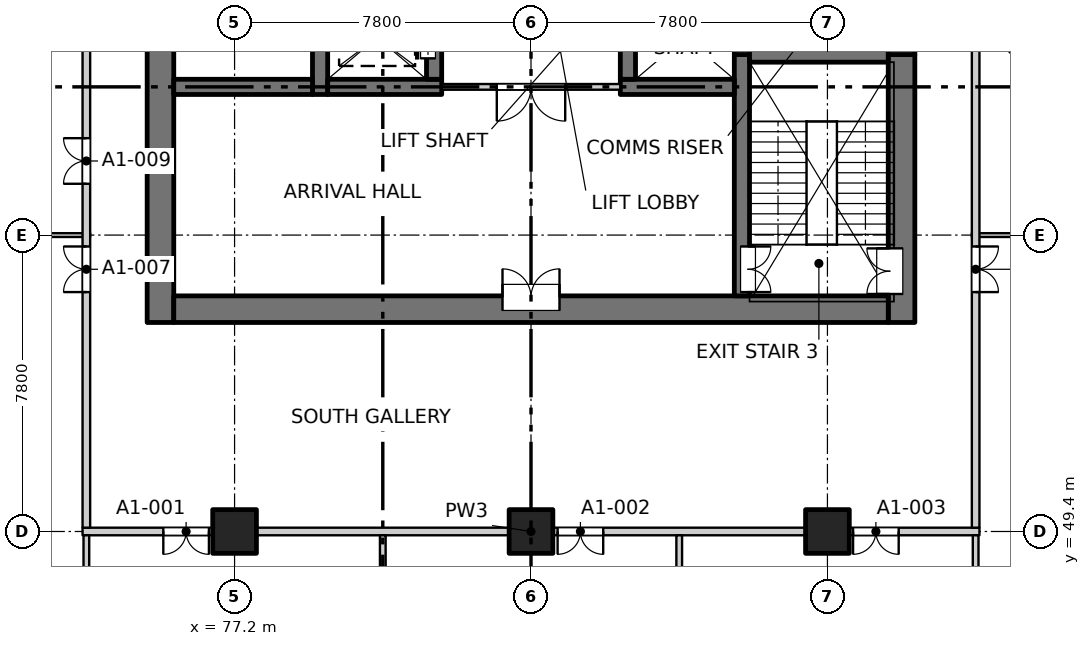
"""IFC4 building model, lengths in metres.
Left out: names, types, materials, properties, quantities, classifications, styles, units other than length and angle.
Written with IfcOpenShell. Run it as: python <this file> out.ifc"""

import sys

from ifc_helpers import new_model, si_unit, direction, frame, frame_2d, origin, origin_2d, place, context, subcontext, project, spatial, rectangle, extrude, element, fill, save


model = new_model("IFC4")
c1 = context("Model", 3, precision=1e-05, world=origin(), true_north=direction((0.0, 1.0)))
c2 = subcontext(c1, "Body", "Model", "MODEL_VIEW")
j1 = project(units=[si_unit("LENGTHUNIT", "METRE"), si_unit("PLANEANGLEUNIT", "RADIAN")], contexts=[c1])
p1 = place(None, origin())
s1 = spatial("IfcSite", under=j1, at=p1, CompositionType="ELEMENT")
p2 = place(p1, origin())
s2 = spatial("IfcBuilding", under=s1, at=p2, CompositionType="ELEMENT")
p3 = place(p2, frame((0.0, 0.0, 15.0)))
s3 = spatial("IfcBuildingStorey", under=s2, at=p3, CompositionType="ELEMENT", Elevation=15.0)
for number, where, z_axis, x_axis in (
    (1, (77.2, 49.4, -0.35), (0.0, 0.0, 1.0), (1.0, 0.0, 0.0)),
    (2, (85.0, 49.4, -0.35), (0.0, 0.0, 1.0), (1.0, 0.0, 0.0)),
    (3, (92.8, 49.4, -0.35), (0.0, 0.0, 1.0), (1.0, 0.0, 0.0)),
):
    element("IfcColumn", number, at=place(p3, frame(where, z_axis=z_axis, x_axis=x_axis)), inside=s3, PredefinedType="COLUMN", context=c2, shape_type="SweptSolid", body=[
        extrude(rectangle(XDim=1.15, YDim=1.15, at=origin_2d()), origin(), (0.0, 0.0, 1.0), 4.6),
    ])
p4 = place(p3, frame((75.25, 54.9, -0.35), z_axis=(0.0, 0.0, 1.0), x_axis=(0.0, 1.0, 0.0)))
e4 = element("IfcWall", 4, at=p4, inside=s3, PredefinedType="SOLIDWALL", context=c2, shape_type="SweptSolid", body=[
    extrude(rectangle(XDim=22.4, YDim=0.7, at=frame_2d((11.2, 0.0))), origin(), (0.0, 0.0, 1.0), 4.6),
])
p5 = place(p4, frame((7.55, 0.0, 0.35)))
e5 = element("IfcOpeningElement", 5, at=p5, cuts=e4, PredefinedType="OPENING", context=c2, shape_type="SweptSolid", body=[
    extrude(rectangle(XDim=0.9, YDim=2.1, at=frame_2d((0.45, 1.05))), frame((0.0, 0.36, 0.0), z_axis=(0.0, -1.0, 0.0), x_axis=(1.0, 0.0, 0.0)), (0.0, 0.0, 1.0), 0.72),
])
p6 = place(p4, frame((10.85, 0.0, 0.35)))
e6 = element("IfcOpeningElement", 6, at=p6, cuts=e4, PredefinedType="OPENING", context=c2, shape_type="SweptSolid", body=[
    extrude(rectangle(XDim=0.9, YDim=2.1, at=frame_2d((0.45, 1.05))), frame((0.0, 0.36, 0.0), z_axis=(0.0, -1.0, 0.0), x_axis=(1.0, 0.0, 0.0)), (0.0, 0.0, 1.0), 0.72),
])
p7 = place(p4, frame((13.85, 0.0, 0.35)))
e7 = element("IfcOpeningElement", 7, at=p7, cuts=e4, PredefinedType="OPENING", context=c2, shape_type="SweptSolid", body=[
    extrude(rectangle(XDim=0.9, YDim=2.1, at=frame_2d((0.45, 1.05))), frame((0.0, 0.36, 0.0), z_axis=(0.0, -1.0, 0.0), x_axis=(1.0, 0.0, 0.0)), (0.0, 0.0, 1.0), 0.72),
])
p8 = place(p4, frame((16.85, 0.0, 0.35)))
e8 = element("IfcOpeningElement", 8, at=p8, cuts=e4, PredefinedType="OPENING", context=c2, shape_type="SweptSolid", body=[
    extrude(rectangle(XDim=0.9, YDim=2.1, at=frame_2d((0.45, 1.05))), frame((0.0, 0.36, 0.0), z_axis=(0.0, -1.0, 0.0), x_axis=(1.0, 0.0, 0.0)), (0.0, 0.0, 1.0), 0.72),
])
p9 = place(p4, frame((20.15, 0.0, 0.35)))
e9 = element("IfcOpeningElement", 9, at=p9, cuts=e4, PredefinedType="OPENING", context=c2, shape_type="SweptSolid", body=[
    extrude(rectangle(XDim=0.9, YDim=2.1, at=frame_2d((0.45, 1.05))), frame((0.0, 0.36, 0.0), z_axis=(0.0, -1.0, 0.0), x_axis=(1.0, 0.0, 0.0)), (0.0, 0.0, 1.0), 0.72),
])
p10 = place(p3, frame((94.75, 54.9, -0.35), z_axis=(0.0, 0.0, 1.0), x_axis=(0.0, 1.0, 0.0)))
e10 = element("IfcWall", 10, at=p10, inside=s3, PredefinedType="SOLIDWALL", context=c2, shape_type="SweptSolid", body=[
    extrude(rectangle(XDim=7.05, YDim=0.7, at=frame_2d((3.525, 0.0))), origin(), (0.0, 0.0, 1.0), 4.6),
])
p11 = place(p10, frame((0.75, 0.0, 0.35)))
e11 = element("IfcOpeningElement", 11, at=p11, cuts=e10, PredefinedType="OPENING", context=c2, shape_type="SweptSolid", body=[
    extrude(rectangle(XDim=1.2, YDim=2.1, at=frame_2d((0.6, 1.05))), frame((0.0, 0.36, 0.0), z_axis=(0.0, -1.0, 0.0), x_axis=(1.0, 0.0, 0.0)), (0.0, 0.0, 1.0), 0.72),
])
p12 = place(p3, frame((94.75, 61.95, -0.35), z_axis=(0.0, 0.0, 1.0), x_axis=(0.0, 1.0, 0.0)))
e12 = element("IfcWall", 12, at=p12, inside=s3, PredefinedType="SOLIDWALL", context=c2, shape_type="SweptSolid", body=[
    extrude(rectangle(XDim=15.35, YDim=0.7, at=frame_2d((7.675, 0.0))), origin(), (0.0, 0.0, 1.0), 4.6),
])
p13 = place(p12, frame((0.925, 0.0, 0.35)))
e13 = element("IfcOpeningElement", 13, at=p13, cuts=e12, PredefinedType="OPENING", context=c2, shape_type="SweptSolid", body=[
    extrude(rectangle(XDim=0.9, YDim=2.1, at=frame_2d((0.45, 1.05))), frame((0.0, 0.36, 0.0), z_axis=(0.0, -1.0, 0.0), x_axis=(1.0, 0.0, 0.0)), (0.0, 0.0, 1.0), 0.72),
])
p14 = place(p12, frame((3.8, 0.0, 0.35)))
e14 = element("IfcOpeningElement", 14, at=p14, cuts=e12, PredefinedType="OPENING", context=c2, shape_type="SweptSolid", body=[
    extrude(rectangle(XDim=0.9, YDim=2.1, at=frame_2d((0.45, 1.05))), frame((0.0, 0.36, 0.0), z_axis=(0.0, -1.0, 0.0), x_axis=(1.0, 0.0, 0.0)), (0.0, 0.0, 1.0), 0.72),
])
p15 = place(p12, frame((6.8, 0.0, 0.35)))
e15 = element("IfcOpeningElement", 15, at=p15, cuts=e12, PredefinedType="OPENING", context=c2, shape_type="SweptSolid", body=[
    extrude(rectangle(XDim=0.9, YDim=2.1, at=frame_2d((0.45, 1.05))), frame((0.0, 0.36, 0.0), z_axis=(0.0, -1.0, 0.0), x_axis=(1.0, 0.0, 0.0)), (0.0, 0.0, 1.0), 0.72),
])
p16 = place(p12, frame((9.8, 0.0, 0.35)))
e16 = element("IfcOpeningElement", 16, at=p16, cuts=e12, PredefinedType="OPENING", context=c2, shape_type="SweptSolid", body=[
    extrude(rectangle(XDim=0.9, YDim=2.1, at=frame_2d((0.45, 1.05))), frame((0.0, 0.36, 0.0), z_axis=(0.0, -1.0, 0.0), x_axis=(1.0, 0.0, 0.0)), (0.0, 0.0, 1.0), 0.72),
])
p17 = place(p12, frame((13.1, 0.0, 0.35)))
e17 = element("IfcOpeningElement", 17, at=p17, cuts=e12, PredefinedType="OPENING", context=c2, shape_type="SweptSolid", body=[
    extrude(rectangle(XDim=0.9, YDim=2.1, at=frame_2d((0.45, 1.05))), frame((0.0, 0.36, 0.0), z_axis=(0.0, -1.0, 0.0), x_axis=(1.0, 0.0, 0.0)), (0.0, 0.0, 1.0), 0.72),
])
p18 = place(p3, frame((75.6, 55.25, -0.35), z_axis=(0.0, 0.0, 1.0), x_axis=(1.0, 0.0, 0.0)))
e18 = element("IfcWall", 18, at=p18, inside=s3, PredefinedType="SOLIDWALL", context=c2, shape_type="SweptSolid", body=[
    extrude(rectangle(XDim=18.8, YDim=0.7, at=frame_2d((9.4, 0.0))), origin(), (0.0, 0.0, 1.0), 4.6),
])
p19 = place(p18, frame((8.65, 0.0, 0.35)))
e19 = element("IfcOpeningElement", 19, at=p19, cuts=e18, PredefinedType="OPENING", context=c2, shape_type="SweptSolid", body=[
    extrude(rectangle(XDim=1.5, YDim=2.1, at=frame_2d((0.75, 1.05))), frame((0.0, 0.36, 0.0), z_axis=(0.0, -1.0, 0.0), x_axis=(1.0, 0.0, 0.0)), (0.0, 0.0, 1.0), 0.72),
])
p20 = place(p3, frame((79.45, 60.9, -0.35), z_axis=(0.0, 0.0, 1.0), x_axis=(0.0, 1.0, 0.0)))
e20 = element("IfcWall", 20, at=p20, inside=s3, PredefinedType="SOLIDWALL", context=c2, shape_type="SweptSolid", body=[
    extrude(rectangle(XDim=16.4, YDim=0.4, at=frame_2d((8.2, 0.0))), origin(), (0.0, 0.0, 1.0), 4.6),
])
p21 = place(p3, frame((90.55, 55.6, -0.35), z_axis=(0.0, 0.0, 1.0), x_axis=(0.0, 1.0, 0.0)))
e21 = element("IfcWall", 21, at=p21, inside=s3, PredefinedType="SOLIDWALL", context=c2, shape_type="SweptSolid", body=[
    extrude(rectangle(XDim=6.35, YDim=0.4, at=frame_2d((3.175, 0.0))), origin(), (0.0, 0.0, 1.0), 4.6),
])
p22 = place(p21, frame((0.1, 0.0, 0.35)))
e22 = element("IfcOpeningElement", 22, at=p22, cuts=e21, PredefinedType="OPENING", context=c2, shape_type="SweptSolid", body=[
    extrude(rectangle(XDim=1.2, YDim=2.1, at=frame_2d((0.6, 1.05))), frame((0.0, 0.21, 0.0), z_axis=(0.0, -1.0, 0.0), x_axis=(1.0, 0.0, 0.0)), (0.0, 0.0, 1.0), 0.42),
])
p23 = place(p3, frame((90.55, 61.95, -0.35), z_axis=(0.0, 0.0, 1.0), x_axis=(0.0, 1.0, 0.0)))
e23 = element("IfcWall", 23, at=p23, inside=s3, PredefinedType="SOLIDWALL", context=c2, shape_type="SweptSolid", body=[
    extrude(rectangle(XDim=15.35, YDim=0.4, at=frame_2d((7.675, 0.0))), origin(), (0.0, 0.0, 1.0), 4.6),
])
p24 = place(p3, frame((79.65, 61.1, -0.35), z_axis=(0.0, 0.0, 1.0), x_axis=(1.0, 0.0, 0.0)))
e24 = element("IfcWall", 24, at=p24, inside=s3, PredefinedType="SOLIDWALL", context=c2, shape_type="SweptSolid", body=[
    extrude(rectangle(XDim=3.0, YDim=0.4, at=frame_2d((1.5, 0.0))), origin(), (0.0, 0.0, 1.0), 4.6),
])
p25 = place(p3, frame((82.45, 61.3, -0.35), z_axis=(0.0, 0.0, 1.0), x_axis=(0.0, 1.0, 0.0)))
e25 = element("IfcWall", 25, at=p25, inside=s3, PredefinedType="SOLIDWALL", context=c2, shape_type="SweptSolid", body=[
    extrude(rectangle(XDim=2.2, YDim=0.4, at=frame_2d((1.1, 0.0))), origin(), (0.0, 0.0, 1.0), 4.6),
])
p26 = place(p25, frame((0.55, 0.0, 0.35)))
e26 = element("IfcOpeningElement", 26, at=p26, cuts=e25, PredefinedType="OPENING", context=c2, shape_type="SweptSolid", body=[
    extrude(rectangle(XDim=1.1, YDim=2.1, at=frame_2d((0.55, 1.05))), frame((0.0, 0.21, 0.0), z_axis=(0.0, -1.0, 0.0), x_axis=(1.0, 0.0, 0.0)), (0.0, 0.0, 1.0), 0.42),
])
p27 = place(p3, frame((87.35, 61.1, -0.35), z_axis=(0.0, 0.0, 1.0), x_axis=(1.0, 0.0, 0.0)))
e27 = element("IfcWall", 27, at=p27, inside=s3, PredefinedType="SOLIDWALL", context=c2, shape_type="SweptSolid", body=[
    extrude(rectangle(XDim=3.0, YDim=0.4, at=frame_2d((1.5, 0.0))), origin(), (0.0, 0.0, 1.0), 4.6),
])
p28 = place(p3, frame((87.55, 61.3, -0.35), z_axis=(0.0, 0.0, 1.0), x_axis=(0.0, 1.0, 0.0)))
e28 = element("IfcWall", 28, at=p28, inside=s3, PredefinedType="SOLIDWALL", context=c2, shape_type="SweptSolid", body=[
    extrude(rectangle(XDim=2.2, YDim=0.4, at=frame_2d((1.1, 0.0))), origin(), (0.0, 0.0, 1.0), 4.6),
])
for number, where, z_axis, x_axis in (
    (29, (75.6, 61.1, -0.35), (0.0, 0.0, 1.0), (1.0, 0.0, 0.0)),
    (30, (90.75, 61.95, -0.35), (0.0, 0.0, 1.0), (1.0, 0.0, 0.0)),
):
    element("IfcWall", number, at=place(p3, frame(where, z_axis=z_axis, x_axis=x_axis)), inside=s3, PredefinedType="SOLIDWALL", context=c2, shape_type="SweptSolid", body=[
        extrude(rectangle(XDim=3.65, YDim=0.4, at=frame_2d((1.825, 0.0))), origin(), (0.0, 0.0, 1.0), 4.6),
    ])
p29 = place(p3, frame((73.2, 49.4, 0.0), z_axis=(0.0, 0.0, 1.0), x_axis=(1.0, 0.0, 0.0)))
e31 = element("IfcWall", 31, at=p29, inside=s3, PredefinedType="PARTITIONING", context=c2, shape_type="SweptSolid", body=[
    extrude(rectangle(XDim=23.6, YDim=0.2, at=frame_2d((11.8, 0.0))), origin(), (0.0, 0.0, 1.0), 4.25),
])
p30 = place(p29, frame((2.125, 0.0, 0.0)))
e32 = element("IfcOpeningElement", 32, at=p30, cuts=e31, PredefinedType="OPENING", context=c2, shape_type="SweptSolid", body=[
    extrude(rectangle(XDim=1.2, YDim=2.1, at=frame_2d((0.6, 1.05))), frame((0.0, 0.11, 0.0), z_axis=(0.0, -1.0, 0.0), x_axis=(1.0, 0.0, 0.0)), (0.0, 0.0, 1.0), 0.22),
])
p31 = place(p29, frame((12.5, 0.0, 0.0)))
e33 = element("IfcOpeningElement", 33, at=p31, cuts=e31, PredefinedType="OPENING", context=c2, shape_type="SweptSolid", body=[
    extrude(rectangle(XDim=1.2, YDim=2.1, at=frame_2d((0.6, 1.05))), frame((0.0, 0.11, 0.0), z_axis=(0.0, -1.0, 0.0), x_axis=(1.0, 0.0, 0.0)), (0.0, 0.0, 1.0), 0.22),
])
p32 = place(p29, frame((20.275, 0.0, 0.0)))
e34 = element("IfcOpeningElement", 34, at=p32, cuts=e31, PredefinedType="OPENING", context=c2, shape_type="SweptSolid", body=[
    extrude(rectangle(XDim=1.2, YDim=2.1, at=frame_2d((0.6, 1.05))), frame((0.0, 0.11, 0.0), z_axis=(0.0, -1.0, 0.0), x_axis=(1.0, 0.0, 0.0)), (0.0, 0.0, 1.0), 0.22),
])
p33 = place(p3, frame((69.4, 57.2, 0.0), z_axis=(0.0, 0.0, 1.0), x_axis=(1.0, 0.0, 0.0)))
e35 = element("IfcWall", 35, at=p33, inside=s3, PredefinedType="PARTITIONING", context=c2, shape_type="SweptSolid", body=[
    extrude(rectangle(XDim=4.0, YDim=0.1, at=frame_2d((2.0, 0.0))), origin(), (0.0, 0.0, 1.0), 4.25),
])
p34 = place(p3, frame((96.6, 57.2, 0.0), z_axis=(0.0, 0.0, 1.0), x_axis=(1.0, 0.0, 0.0)))
e36 = element("IfcWall", 36, at=p34, inside=s3, PredefinedType="PARTITIONING", context=c2, shape_type="SweptSolid", body=[
    extrude(rectangle(XDim=4.0, YDim=0.1, at=frame_2d((2.0, 0.0))), origin(), (0.0, 0.0, 1.0), 4.25),
])
p35 = place(p3, frame((82.65, 61.1, 0.0), z_axis=(0.0, 0.0, 1.0), x_axis=(1.0, 0.0, 0.0)))
e37 = element("IfcWall", 37, at=p35, inside=s3, PredefinedType="PARTITIONING", context=c2, shape_type="SweptSolid", body=[
    extrude(rectangle(XDim=4.7, YDim=0.15, at=frame_2d((2.35, 0.0))), origin(), (0.0, 0.0, 1.0), 4.25),
])
p36 = place(p35, frame((1.45, 0.0, 0.0)))
e38 = element("IfcOpeningElement", 38, at=p36, cuts=e37, PredefinedType="OPENING", context=c2, shape_type="SweptSolid", body=[
    extrude(rectangle(XDim=1.8, YDim=2.1, at=frame_2d((0.9, 1.05))), frame((0.0, 0.085, 0.0), z_axis=(0.0, -1.0, 0.0), x_axis=(1.0, 0.0, 0.0)), (0.0, 0.0, 1.0), 0.17),
])
p37 = place(p3, frame((73.3, 41.735, 0.0), z_axis=(0.0, 0.0, 1.0), x_axis=(0.0, 1.0, 0.0)))
e39 = element("IfcWall", 39, at=p37, inside=s3, PredefinedType="PARTITIONING", context=c2, shape_type="SweptSolid", body=[
    extrude(rectangle(XDim=7.565, YDim=0.15, at=frame_2d((3.782, 0.0))), origin(), (0.0, 0.0, 1.0), 4.25),
])
p38 = place(p3, frame((73.3, 49.5, 0.0), z_axis=(0.0, 0.0, 1.0), x_axis=(0.0, 1.0, 0.0)))
e40 = element("IfcWall", 40, at=p38, inside=s3, PredefinedType="PARTITIONING", context=c2, shape_type="SweptSolid", body=[
    extrude(rectangle(XDim=34.9, YDim=0.2, at=frame_2d((17.45, 0.0))), origin(), (0.0, 0.0, 1.0), 4.25),
])
p39 = place(p38, frame((6.2, 0.0, 0.0)))
e41 = element("IfcOpeningElement", 41, at=p39, cuts=e40, PredefinedType="OPENING", context=c2, shape_type="SweptSolid", body=[
    extrude(rectangle(XDim=1.2, YDim=2.1, at=frame_2d((0.6, 1.05))), frame((0.0, 0.11, 0.0), z_axis=(0.0, -1.0, 0.0), x_axis=(1.0, 0.0, 0.0)), (0.0, 0.0, 1.0), 0.22),
])
p40 = place(p38, frame((9.05, 0.0, 0.0)))
e42 = element("IfcOpeningElement", 42, at=p40, cuts=e40, PredefinedType="OPENING", context=c2, shape_type="SweptSolid", body=[
    extrude(rectangle(XDim=1.2, YDim=2.1, at=frame_2d((0.6, 1.05))), frame((0.0, 0.11, 0.0), z_axis=(0.0, -1.0, 0.0), x_axis=(1.0, 0.0, 0.0)), (0.0, 0.0, 1.0), 0.22),
])
p41 = place(p38, frame((28.55, 0.0, 0.0)))
e43 = element("IfcOpeningElement", 43, at=p41, cuts=e40, PredefinedType="OPENING", context=c2, shape_type="SweptSolid", body=[
    extrude(rectangle(XDim=1.2, YDim=2.1, at=frame_2d((0.6, 1.05))), frame((0.0, 0.11, 0.0), z_axis=(0.0, -1.0, 0.0), x_axis=(1.0, 0.0, 0.0)), (0.0, 0.0, 1.0), 0.22),
])
p42 = place(p38, frame((32.45, 0.0, 0.0)))
e44 = element("IfcOpeningElement", 44, at=p42, cuts=e40, PredefinedType="OPENING", context=c2, shape_type="SweptSolid", body=[
    extrude(rectangle(XDim=1.2, YDim=2.1, at=frame_2d((0.6, 1.05))), frame((0.0, 0.11, 0.0), z_axis=(0.0, -1.0, 0.0), x_axis=(1.0, 0.0, 0.0)), (0.0, 0.0, 1.0), 0.22),
])
for number, where, z_axis, x_axis in (
    (45, (81.1, 41.735, 0.0), (0.0, 0.0, 1.0), (0.0, 1.0, 0.0)),
    (46, (88.9, 41.735, 0.0), (0.0, 0.0, 1.0), (0.0, 1.0, 0.0)),
    (47, (96.7, 41.735, 0.0), (0.0, 0.0, 1.0), (0.0, 1.0, 0.0)),
):
    element("IfcWall", number, at=place(p3, frame(where, z_axis=z_axis, x_axis=x_axis)), inside=s3, PredefinedType="PARTITIONING", context=c2, shape_type="SweptSolid", body=[
        extrude(rectangle(XDim=7.565, YDim=0.15, at=frame_2d((3.782, 0.0))), origin(), (0.0, 0.0, 1.0), 4.25),
    ])
p43 = place(p3, frame((96.7, 49.5, 0.0), z_axis=(0.0, 0.0, 1.0), x_axis=(0.0, 1.0, 0.0)))
e48 = element("IfcWall", 48, at=p43, inside=s3, PredefinedType="PARTITIONING", context=c2, shape_type="SweptSolid", body=[
    extrude(rectangle(XDim=34.9, YDim=0.2, at=frame_2d((17.45, 0.0))), origin(), (0.0, 0.0, 1.0), 4.25),
])
p44 = place(p43, frame((6.2, 0.0, 0.0)))
e49 = element("IfcOpeningElement", 49, at=p44, cuts=e48, PredefinedType="OPENING", context=c2, shape_type="SweptSolid", body=[
    extrude(rectangle(XDim=1.2, YDim=2.1, at=frame_2d((0.6, 1.05))), frame((0.0, 0.11, 0.0), z_axis=(0.0, -1.0, 0.0), x_axis=(1.0, 0.0, 0.0)), (0.0, 0.0, 1.0), 0.22),
])
p45 = place(p43, frame((12.95, 0.0, 0.0)))
e50 = element("IfcOpeningElement", 50, at=p45, cuts=e48, PredefinedType="OPENING", context=c2, shape_type="SweptSolid", body=[
    extrude(rectangle(XDim=1.2, YDim=2.1, at=frame_2d((0.6, 1.05))), frame((0.0, 0.11, 0.0), z_axis=(0.0, -1.0, 0.0), x_axis=(1.0, 0.0, 0.0)), (0.0, 0.0, 1.0), 0.22),
])
p46 = place(p43, frame((16.85, 0.0, 0.0)))
e51 = element("IfcOpeningElement", 51, at=p46, cuts=e48, PredefinedType="OPENING", context=c2, shape_type="SweptSolid", body=[
    extrude(rectangle(XDim=1.2, YDim=2.1, at=frame_2d((0.6, 1.05))), frame((0.0, 0.11, 0.0), z_axis=(0.0, -1.0, 0.0), x_axis=(1.0, 0.0, 0.0)), (0.0, 0.0, 1.0), 0.22),
])
p47 = place(p43, frame((32.45, 0.0, 0.0)))
e52 = element("IfcOpeningElement", 52, at=p47, cuts=e48, PredefinedType="OPENING", context=c2, shape_type="SweptSolid", body=[
    extrude(rectangle(XDim=1.2, YDim=2.1, at=frame_2d((0.6, 1.05))), frame((0.0, 0.11, 0.0), z_axis=(0.0, -1.0, 0.0), x_axis=(1.0, 0.0, 0.0)), (0.0, 0.0, 1.0), 0.22),
])
p48 = place(p30, origin())
e53 = element("IfcDoor", 53, at=p48, inside=s3, OperationType="DOUBLE_DOOR_SINGLE_SWING", PredefinedType="DOOR", context=c2, shape_type="SweptSolid", body=[
    extrude(rectangle(XDim=1.2, YDim=2.1, at=frame_2d((0.6, 1.05))), frame((0.0, 0.025, 0.0), z_axis=(0.0, -1.0, 0.0), x_axis=(1.0, 0.0, 0.0)), (0.0, 0.0, 1.0), 0.05),
])
fill(e32, e53)
p49 = place(p31, origin())
e54 = element("IfcDoor", 54, at=p49, inside=s3, OperationType="DOUBLE_DOOR_SINGLE_SWING", PredefinedType="DOOR", context=c2, shape_type="SweptSolid", body=[
    extrude(rectangle(XDim=1.2, YDim=2.1, at=frame_2d((0.6, 1.05))), frame((0.0, 0.025, 0.0), z_axis=(0.0, -1.0, 0.0), x_axis=(1.0, 0.0, 0.0)), (0.0, 0.0, 1.0), 0.05),
])
fill(e33, e54)
p50 = place(p32, origin())
e55 = element("IfcDoor", 55, at=p50, inside=s3, OperationType="DOUBLE_DOOR_SINGLE_SWING", PredefinedType="DOOR", context=c2, shape_type="SweptSolid", body=[
    extrude(rectangle(XDim=1.2, YDim=2.1, at=frame_2d((0.6, 1.05))), frame((0.0, 0.025, 0.0), z_axis=(0.0, -1.0, 0.0), x_axis=(1.0, 0.0, 0.0)), (0.0, 0.0, 1.0), 0.05),
])
fill(e34, e55)
p51 = place(p19, origin())
e56 = element("IfcDoor", 56, at=p51, inside=s3, OperationType="DOUBLE_DOOR_SINGLE_SWING", PredefinedType="DOOR", context=c2, shape_type="SweptSolid", body=[
    extrude(rectangle(XDim=1.5, YDim=2.1, at=frame_2d((0.75, 1.05))), frame((0.0, 0.335, 0.0), z_axis=(0.0, -1.0, 0.0), x_axis=(1.0, 0.0, 0.0)), (0.0, 0.0, 1.0), 0.05),
])
fill(e19, e56)
p52 = place(p22, origin())
e57 = element("IfcDoor", 57, at=p52, inside=s3, OperationType="DOUBLE_DOOR_SINGLE_SWING", PredefinedType="DOOR", context=c2, shape_type="SweptSolid", body=[
    extrude(rectangle(XDim=1.2, YDim=2.1, at=frame_2d((0.6, 1.05))), frame((0.0, -0.135, 0.0), z_axis=(0.0, -1.0, 0.0), x_axis=(1.0, 0.0, 0.0)), (0.0, 0.0, 1.0), 0.05),
])
fill(e22, e57)
p53 = place(p11, origin())
e58 = element("IfcDoor", 58, at=p53, inside=s3, OperationType="DOUBLE_DOOR_SINGLE_SWING", PredefinedType="DOOR", context=c2, shape_type="SweptSolid", body=[
    extrude(rectangle(XDim=1.2, YDim=2.1, at=frame_2d((0.6, 1.05))), frame((0.0, 0.335, 0.0), z_axis=(0.0, -1.0, 0.0), x_axis=(1.0, 0.0, 0.0)), (0.0, 0.0, 1.0), 0.05),
])
fill(e11, e58)
p54 = place(p39, origin())
e59 = element("IfcDoor", 59, at=p54, inside=s3, OperationType="DOUBLE_DOOR_SINGLE_SWING", PredefinedType="DOOR", context=c2, shape_type="SweptSolid", body=[
    extrude(rectangle(XDim=1.2, YDim=2.1, at=frame_2d((0.6, 1.05))), frame((0.0, 0.025, 0.0), z_axis=(0.0, -1.0, 0.0), x_axis=(1.0, 0.0, 0.0)), (0.0, 0.0, 1.0), 0.05),
])
fill(e41, e59)
p55 = place(p44, origin())
e60 = element("IfcDoor", 60, at=p55, inside=s3, OperationType="DOUBLE_DOOR_SINGLE_SWING", PredefinedType="DOOR", context=c2, shape_type="SweptSolid", body=[
    extrude(rectangle(XDim=1.2, YDim=2.1, at=frame_2d((0.6, 1.05))), frame((0.0, 0.025, 0.0), z_axis=(0.0, -1.0, 0.0), x_axis=(1.0, 0.0, 0.0)), (0.0, 0.0, 1.0), 0.05),
])
fill(e49, e60)
p56 = place(p40, origin())
e61 = element("IfcDoor", 61, at=p56, inside=s3, OperationType="DOUBLE_DOOR_SINGLE_SWING", PredefinedType="DOOR", context=c2, shape_type="SweptSolid", body=[
    extrude(rectangle(XDim=1.2, YDim=2.1, at=frame_2d((0.6, 1.05))), frame((0.0, 0.025, 0.0), z_axis=(0.0, -1.0, 0.0), x_axis=(1.0, 0.0, 0.0)), (0.0, 0.0, 1.0), 0.05),
])
fill(e42, e61)
p57 = place(p36, origin())
e62 = element("IfcDoor", 62, at=p57, inside=s3, OperationType="DOUBLE_DOOR_SINGLE_SWING", PredefinedType="DOOR", context=c2, shape_type="SweptSolid", body=[
    extrude(rectangle(XDim=1.8, YDim=2.1, at=frame_2d((0.9, 1.05))), frame((0.0, 0.025, 0.0), z_axis=(0.0, -1.0, 0.0), x_axis=(1.0, 0.0, 0.0)), (0.0, 0.0, 1.0), 0.05),
])
fill(e38, e62)
p58 = place(p26, origin())
e63 = element("IfcDoor", 63, at=p58, inside=s3, OperationType="SLIDING_TO_RIGHT", PredefinedType="DOOR", context=c2, shape_type="SweptSolid", body=[
    extrude(rectangle(XDim=1.1, YDim=2.1, at=frame_2d((0.55, 1.05))), frame((0.0, 0.185, 0.0), z_axis=(0.0, -1.0, 0.0), x_axis=(1.0, 0.0, 0.0)), (0.0, 0.0, 1.0), 0.05),
])
fill(e26, e63)
save(model, sys.argv[1])
